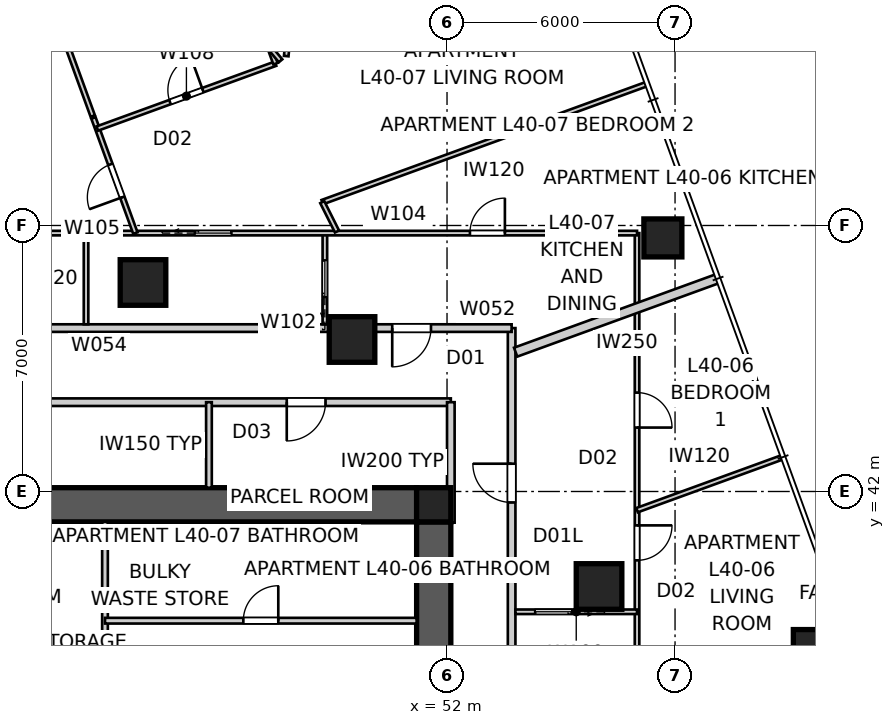
"""IFC4 building model, lengths in metres.
Left out: names, types, materials, properties, quantities, classifications, styles, units other than length and angle.
Written with IfcOpenShell. Run it as: python <this file> out.ifc"""

import sys

from ifc_helpers import new_model, si_unit, direction, frame, frame_2d, origin, origin_2d, place, context, subcontext, project, spatial, polyline, rectangle, outline, extrude, element, fill, save


model = new_model("IFC4")
c1 = context("Model", 3, precision=1e-05, world=origin(), true_north=direction((0.0, 1.0)))
c2 = subcontext(c1, "Body", "Model", "MODEL_VIEW")
j1 = project(units=[si_unit("LENGTHUNIT", "METRE"), si_unit("PLANEANGLEUNIT", "RADIAN")], contexts=[c1])
p1 = place(None, origin())
s1 = spatial("IfcSite", under=j1, at=p1, CompositionType="ELEMENT")
p2 = place(p1, origin())
s2 = spatial("IfcBuilding", under=s1, at=p2, CompositionType="ELEMENT")
p3 = place(p2, frame((0.0, 0.0, 147.2)))
s3 = spatial("IfcBuildingStorey", under=s2, at=p3, CompositionType="ELEMENT", Elevation=147.2)
p4 = place(p3, frame((28.8, 41.65, 0.0), z_axis=(0.0, 0.0, 1.0), x_axis=(1.0, 0.0, 0.0)))
e1 = element("IfcWall", 1, at=p4, inside=s3, PredefinedType="SHEAR", context=c2, shape_type="SweptSolid", body=[
    extrude(outline(polyline([(0.0, -0.45), (22.4, -0.45), (22.4, -0.025), (22.85, -0.025), (22.85, 0.025), (22.4, 0.025), (22.4, 0.45), (0.0, 0.45), (0.0, 0.025), (-0.45, 0.025), (-0.45, -0.025), (0.0, -0.025), (0.0, -0.45)])), origin(), (0.0, 0.0, 1.0), 3.4),
])
p5 = place(p3, frame((51.65, 18.8, 0.0), z_axis=(0.0, 0.0, 1.0), x_axis=(0.0, 1.0, 0.0)))
e2 = element("IfcWall", 2, at=p5, inside=s3, PredefinedType="SHEAR", context=c2, shape_type="SweptSolid", body=[
    extrude(outline(polyline([(0.0, -0.45), (22.4, -0.45), (22.4, -0.025), (22.85, -0.025), (22.85, 0.025), (22.4, 0.025), (22.4, 0.45), (0.0, 0.45), (0.0, 0.025), (-0.45, 0.025), (-0.45, -0.025), (0.0, -0.025), (0.0, -0.45)])), origin(), (0.0, 0.0, 1.0), 3.4),
])
p6 = place(p5, frame((11.14, 0.0, 0.0)))
e3 = element("IfcOpeningElement", 3, at=p6, cuts=e2, PredefinedType="OPENING", context=c2, shape_type="SweptSolid", body=[
    extrude(rectangle(XDim=1.02, YDim=2.4, at=frame_2d((0.51, 1.2))), frame((0.0, 0.46, 0.0), z_axis=(0.0, -1.0, 0.0), x_axis=(1.0, 0.0, 0.0)), (0.0, 0.0, 1.0), 0.92),
])
p7 = place(p3, frame((51.65, 41.65, 0.0), z_axis=(0.0, 0.0, 1.0), x_axis=(1.0, 0.0, 0.0)))
e4 = element("IfcColumn", 4, at=p7, inside=s3, PredefinedType="COLUMN", context=c2, shape_type="SweptSolid", body=[
    extrude(rectangle(XDim=0.9, YDim=0.9, at=origin_2d()), origin(), (0.0, 0.0, 1.0), 3.4),
])
for number, where, z_axis, x_axis in (
    (5, (61.613, 37.866, 0.0), (0.0, 0.0, 1.0), (1.0, 0.0, 0.0)),
    (6, (57.68, 48.673, 0.0), (0.0, 0.0, 1.0), (1.0, 0.0, 0.0)),
):
    element("IfcColumn", number, at=place(p3, frame(where, z_axis=z_axis, x_axis=x_axis)), inside=s3, PredefinedType="COLUMN", context=c2, shape_type="SweptSolid", body=[
        extrude(rectangle(XDim=1.0, YDim=1.0, at=origin_2d()), origin(), (0.0, 0.0, 1.0), 3.4),
    ])
for number, where, z_axis, x_axis in (
    (7, (56.0, 39.5, 0.0), (0.0, 0.0, 1.0), (1.0, 0.0, 0.0)),
    (8, (49.5, 46.0, 0.0), (0.0, 0.0, 1.0), (1.0, 0.0, 0.0)),
    (9, (44.0, 47.5, 0.0), (0.0, 0.0, 1.0), (1.0, 0.0, 0.0)),
):
    element("IfcColumn", number, at=place(p3, frame(where, z_axis=z_axis, x_axis=x_axis)), inside=s3, PredefinedType="COLUMN", context=c2, shape_type="SweptSolid", body=[
        extrude(rectangle(XDim=1.2, YDim=1.2, at=origin_2d()), origin(), (0.0, 0.0, 1.0), 3.4),
    ])
p8 = place(p3, frame((53.7, 13.3, 0.0), z_axis=(0.0, 0.0, 1.0), x_axis=(0.0, 1.0, 0.0)))
e10 = element("IfcWall", 10, at=p8, inside=s3, PredefinedType="PARTITIONING", context=c2, shape_type="SweptSolid", body=[
    extrude(rectangle(XDim=33.0, YDim=0.2, at=frame_2d((16.5, 0.0))), origin(), (0.0, 0.0, 1.0), 3.25),
])
p9 = place(p8, frame((28.411, 0.0, 0.0)))
e11 = element("IfcOpeningElement", 11, at=p9, cuts=e10, PredefinedType="OPENING", context=c2, shape_type="SweptSolid", body=[
    extrude(rectangle(XDim=1.02, YDim=2.1, at=frame_2d((0.51, 1.05))), frame((0.0, 0.11, 0.0), z_axis=(0.0, -1.0, 0.0), x_axis=(1.0, 0.0, 0.0)), (0.0, 0.0, 1.0), 0.22),
])
p10 = place(p8, frame((13.741, 0.0, 0.0)))
e12 = element("IfcOpeningElement", 12, at=p10, cuts=e10, PredefinedType="OPENING", context=c2, shape_type="SweptSolid", body=[
    extrude(rectangle(XDim=1.02, YDim=2.34, at=frame_2d((0.51, 1.17))), frame((0.0, 0.11, 0.0), z_axis=(0.0, -1.0, 0.0), x_axis=(1.0, 0.0, 0.0)), (0.0, 0.0, 1.0), 0.22),
])
p11 = place(p3, frame((53.7, 46.3, 0.0), z_axis=(0.0, 0.0, 1.0), x_axis=(-1.0, 0.0, 0.0)))
e13 = element("IfcWall", 13, at=p11, inside=s3, PredefinedType="PARTITIONING", context=c2, shape_type="SweptSolid", body=[
    extrude(rectangle(XDim=4.458, YDim=0.2, at=frame_2d((2.229, 0.0))), origin(), (0.0, 0.0, 1.0), 3.25),
])
p12 = place(p11, frame((2.122, 0.0, 0.0)))
e14 = element("IfcOpeningElement", 14, at=p12, cuts=e13, PredefinedType="OPENING", context=c2, shape_type="SweptSolid", body=[
    extrude(rectangle(XDim=1.02, YDim=2.34, at=frame_2d((0.51, 1.17))), frame((0.0, 0.11, 0.0), z_axis=(0.0, -1.0, 0.0), x_axis=(1.0, 0.0, 0.0)), (0.0, 0.0, 1.0), 0.22),
])
p13 = place(p3, frame((49.242, 46.3, 0.0), z_axis=(0.0, 0.0, 1.0), x_axis=(-1.0, 0.0, 0.0)))
e15 = element("IfcWall", 15, at=p13, inside=s3, PredefinedType="PARTITIONING", context=c2, shape_type="SweptSolid", body=[
    extrude(rectangle(XDim=1.683, YDim=0.2, at=frame_2d((0.842, 0.0))), origin(), (0.0, 0.0, 1.0), 2.55),
])
p14 = place(p3, frame((47.558, 46.3, 0.0), z_axis=(0.0, 0.0, 1.0), x_axis=(-1.0, 0.0, 0.0)))
e16 = element("IfcWall", 16, at=p14, inside=s3, PredefinedType="PARTITIONING", context=c2, shape_type="SweptSolid", body=[
    extrude(rectangle(XDim=15.117, YDim=0.2, at=frame_2d((7.558, 0.0))), origin(), (0.0, 0.0, 1.0), 3.25),
])
p15 = place(p14, frame((9.422, 0.0, 0.0)))
e17 = element("IfcOpeningElement", 17, at=p15, cuts=e16, PredefinedType="OPENING", context=c2, shape_type="SweptSolid", body=[
    extrude(rectangle(XDim=1.02, YDim=2.34, at=frame_2d((0.51, 1.17))), frame((0.0, 0.11, 0.0), z_axis=(0.0, -1.0, 0.0), x_axis=(1.0, 0.0, 0.0)), (0.0, 0.0, 1.0), 0.22),
])
p16 = place(p3, frame((62.553, 38.208, 0.0), z_axis=(0.0, 0.0, 1.0), x_axis=(-0.939693071685, -0.342018904489, 0.0)))
e18 = element("IfcWall", 18, at=p16, inside=s3, PredefinedType="PARTITIONING", context=c2, shape_type="SweptSolid", body=[
    extrude(rectangle(XDim=9.309, YDim=0.25, at=frame_2d((4.654, 0.0))), origin(), (0.0, 0.0, 1.0), 3.25),
])
p17 = place(p3, frame((59.132, 47.605, 0.0), z_axis=(0.0, 0.0, 1.0), x_axis=(-0.939690274876, -0.342026588591, 0.0)))
e19 = element("IfcWall", 19, at=p17, inside=s3, PredefinedType="PARTITIONING", context=c2, shape_type="SweptSolid", body=[
    extrude(rectangle(XDim=5.669, YDim=0.25, at=frame_2d((2.834, 0.0))), origin(), (0.0, 0.0, 1.0), 3.25),
])
p18 = place(p3, frame((43.0, 41.2, 0.0), z_axis=(0.0, 0.0, 1.0), x_axis=(0.0, -1.0, 0.0)))
e20 = element("IfcWall", 20, at=p18, inside=s3, PredefinedType="SOLIDWALL", context=c2, shape_type="SweptSolid", body=[
    extrude(rectangle(XDim=5.9, YDim=0.15, at=frame_2d((2.95, 0.0))), origin(), (0.0, 0.0, 1.0), 3.25),
])
p19 = place(p3, frame((43.0, 38.6, 0.0), z_axis=(0.0, 0.0, 1.0), x_axis=(1.0, 0.0, 0.0)))
e21 = element("IfcWall", 21, at=p19, inside=s3, PredefinedType="SOLIDWALL", context=c2, shape_type="SweptSolid", body=[
    extrude(rectangle(XDim=8.2, YDim=0.15, at=frame_2d((4.1, 0.0))), origin(), (0.0, 0.0, 1.0), 3.25),
])
p20 = place(p19, frame((3.64, 0.0, 0.0)))
e22 = element("IfcOpeningElement", 22, at=p20, cuts=e21, PredefinedType="OPENING", context=c2, shape_type="SweptSolid", body=[
    extrude(rectangle(XDim=0.92, YDim=2.1, at=frame_2d((0.46, 1.05))), frame((0.0, 0.085, 0.0), z_axis=(0.0, -1.0, 0.0), x_axis=(1.0, 0.0, 0.0)), (0.0, 0.0, 1.0), 0.17),
])
p21 = place(p3, frame((52.1, 44.35, 0.0), z_axis=(0.0, 0.0, 1.0), x_axis=(-1.0, 0.0, 0.0)))
e23 = element("IfcWall", 23, at=p21, inside=s3, PredefinedType="PARTITIONING", context=c2, shape_type="SweptSolid", body=[
    extrude(rectangle(XDim=24.2, YDim=0.2, at=frame_2d((12.1, 0.0))), origin(), (0.0, 0.0, 1.0), 3.25),
])
p22 = place(p21, frame((10.743, 0.0, 0.0)))
e24 = element("IfcOpeningElement", 24, at=p22, cuts=e23, PredefinedType="OPENING", context=c2, shape_type="SweptSolid", body=[
    extrude(rectangle(XDim=1.02, YDim=2.1, at=frame_2d((0.51, 1.05))), frame((0.0, 0.11, 0.0), z_axis=(0.0, -1.0, 0.0), x_axis=(1.0, 0.0, 0.0)), (0.0, 0.0, 1.0), 0.22),
])
p23 = place(p21, frame((19.636, 0.0, 0.0)))
e25 = element("IfcOpeningElement", 25, at=p23, cuts=e23, PredefinedType="OPENING", context=c2, shape_type="SweptSolid", body=[
    extrude(rectangle(XDim=1.02, YDim=2.1, at=frame_2d((0.51, 1.05))), frame((0.0, 0.11, 0.0), z_axis=(0.0, -1.0, 0.0), x_axis=(1.0, 0.0, 0.0)), (0.0, 0.0, 1.0), 0.22),
])
p24 = place(p21, frame((3.297, 0.0, 0.0)))
e26 = element("IfcOpeningElement", 26, at=p24, cuts=e23, PredefinedType="OPENING", context=c2, shape_type="SweptSolid", body=[
    extrude(rectangle(XDim=1.02, YDim=2.1, at=frame_2d((0.51, 1.05))), frame((0.0, 0.11, 0.0), z_axis=(0.0, -1.0, 0.0), x_axis=(1.0, 0.0, 0.0)), (0.0, 0.0, 1.0), 0.22),
])
p25 = place(p3, frame((52.1, 41.18, 0.0), z_axis=(0.0, 0.0, 1.0), x_axis=(0.0, 1.0, 0.0)))
e27 = element("IfcWall", 27, at=p25, inside=s3, PredefinedType="PARTITIONING", context=c2, shape_type="SweptSolid", body=[
    extrude(rectangle(XDim=3.17, YDim=0.2, at=frame_2d((1.585, 0.0))), origin(), (0.0, 0.0, 1.0), 3.25),
])
p26 = place(p3, frame((45.735, 42.1, 0.0), z_axis=(0.0, 0.0, 1.0), x_axis=(0.0, 1.0, 0.0)))
e28 = element("IfcWall", 28, at=p26, inside=s3, PredefinedType="SOLIDWALL", context=c2, shape_type="SweptSolid", body=[
    extrude(rectangle(XDim=2.25, YDim=0.15, at=frame_2d((1.125, 0.0))), origin(), (0.0, 0.0, 1.0), 2.796),
])
p27 = place(p3, frame((57.0, 48.8, 0.0), z_axis=(0.0, 0.0, 1.0), x_axis=(0.0, -1.0, 0.0)))
e29 = element("IfcWall", 29, at=p27, inside=s3, PredefinedType="PARTITIONING", context=c2, shape_type="SweptSolid", body=[
    extrude(rectangle(XDim=38.113, YDim=0.12, at=frame_2d((19.056, 0.0))), origin(), (0.0, 0.0, 1.0), 2.55),
])
p28 = place(p27, frame((4.198, 0.0, 0.0)))
e30 = element("IfcOpeningElement", 30, at=p28, cuts=e29, PredefinedType="OPENING", context=c2, shape_type="SweptSolid", body=[
    extrude(rectangle(XDim=0.92, YDim=2.34, at=frame_2d((0.46, 1.17))), frame((0.0, 0.07, 0.0), z_axis=(0.0, -1.0, 0.0), x_axis=(1.0, 0.0, 0.0)), (0.0, 0.0, 1.0), 0.14),
])
p29 = place(p27, frame((7.692, 0.0, 0.0)))
e31 = element("IfcOpeningElement", 31, at=p29, cuts=e29, PredefinedType="OPENING", context=c2, shape_type="SweptSolid", body=[
    extrude(rectangle(XDim=0.92, YDim=2.34, at=frame_2d((0.46, 1.17))), frame((0.0, 0.07, 0.0), z_axis=(0.0, -1.0, 0.0), x_axis=(1.0, 0.0, 0.0)), (0.0, 0.0, 1.0), 0.14),
])
p30 = place(p27, frame((20.162, 0.0, 0.0)))
e32 = element("IfcOpeningElement", 32, at=p30, cuts=e29, PredefinedType="OPENING", context=c2, shape_type="SweptSolid", body=[
    extrude(rectangle(XDim=0.92, YDim=2.34, at=frame_2d((0.46, 1.17))), frame((0.0, 0.07, 0.0), z_axis=(0.0, -1.0, 0.0), x_axis=(1.0, 0.0, 0.0)), (0.0, 0.0, 1.0), 0.14),
])
p31 = place(p27, frame((34.056, 0.0, 0.0)))
e33 = element("IfcOpeningElement", 33, at=p31, cuts=e29, PredefinedType="OPENING", context=c2, shape_type="SweptSolid", body=[
    extrude(rectangle(XDim=0.92, YDim=2.34, at=frame_2d((0.46, 1.17))), frame((0.0, 0.07, 0.0), z_axis=(0.0, -1.0, 0.0), x_axis=(1.0, 0.0, 0.0)), (0.0, 0.0, 1.0), 0.14),
])
p32 = place(p27, frame((24.482, 0.0, 0.0)))
e34 = element("IfcOpeningElement", 34, at=p32, cuts=e29, PredefinedType="OPENING", context=c2, shape_type="SweptSolid", body=[
    extrude(rectangle(XDim=0.96, YDim=2.1, at=frame_2d((0.48, 1.05))), frame((0.0, 0.07, 0.0), z_axis=(0.0, -1.0, 0.0), x_axis=(1.0, 0.0, 0.0)), (0.0, 0.0, 1.0), 0.14),
])
p33 = place(p3, frame((57.0, 38.835, 0.0), z_axis=(0.0, 0.0, 1.0), x_axis=(-1.0, 0.0, 0.0)))
e35 = element("IfcWall", 35, at=p33, inside=s3, PredefinedType="PARTITIONING", context=c2, shape_type="SweptSolid", body=[
    extrude(rectangle(XDim=3.2, YDim=0.12, at=frame_2d((1.6, 0.0))), origin(), (0.0, 0.0, 1.0), 2.796),
])
p34 = place(p33, frame((1.72, 0.0, 0.0)))
e36 = element("IfcOpeningElement", 36, at=p34, cuts=e35, PredefinedType="OPENING", context=c2, shape_type="SweptSolid", body=[
    extrude(rectangle(XDim=0.96, YDim=2.1, at=frame_2d((0.48, 1.05))), frame((0.0, 0.07, 0.0), z_axis=(0.0, -1.0, 0.0), x_axis=(1.0, 0.0, 0.0)), (0.0, 0.0, 1.0), 0.14),
])
p35 = place(p3, frame((57.0, 41.508, 0.0), z_axis=(0.0, 0.0, 1.0), x_axis=(0.939682468191, 0.342048036063, 0.0)))
e37 = element("IfcWall", 37, at=p35, inside=s3, PredefinedType="PARTITIONING", context=c2, shape_type="SweptSolid", body=[
    extrude(rectangle(XDim=4.049, YDim=0.12, at=frame_2d((2.024, 0.0))), origin(), (0.0, 0.0, 1.0), 3.25),
])
p36 = place(p3, frame((48.786, 46.4, 0.0), z_axis=(0.0, 0.0, 1.0), x_axis=(0.0, 1.0, 0.0)))
e38 = element("IfcWall", 38, at=p36, inside=s3, PredefinedType="PARTITIONING", context=c2, shape_type="SweptSolid", body=[
    extrude(rectangle(XDim=2.4, YDim=0.12, at=frame_2d((1.2, 0.0))), origin(), (0.0, 0.0, 1.0), 3.25),
])
p37 = place(p36, frame((0.72, 0.0, 0.0)))
e39 = element("IfcOpeningElement", 39, at=p37, cuts=e38, PredefinedType="OPENING", context=c2, shape_type="SweptSolid", body=[
    extrude(rectangle(XDim=0.96, YDim=2.1, at=frame_2d((0.48, 1.05))), frame((0.0, 0.07, 0.0), z_axis=(0.0, -1.0, 0.0), x_axis=(1.0, 0.0, 0.0)), (0.0, 0.0, 1.0), 0.14),
])
p38 = place(p3, frame((42.501, 46.4, 0.0), z_axis=(0.0, 0.0, 1.0), x_axis=(0.0, 1.0, 0.0)))
e40 = element("IfcWall", 40, at=p38, inside=s3, PredefinedType="PARTITIONING", context=c2, shape_type="SweptSolid", body=[
    extrude(rectangle(XDim=2.4, YDim=0.12, at=frame_2d((1.2, 0.0))), origin(), (0.0, 0.0, 1.0), 3.25),
])
p39 = place(p3, frame((37.2, 48.8, 0.0), z_axis=(0.0, 0.0, 1.0), x_axis=(1.0, 0.0, 0.0)))
e41 = element("IfcWall", 41, at=p39, inside=s3, PredefinedType="PARTITIONING", context=c2, shape_type="SweptSolid", body=[
    extrude(rectangle(XDim=19.8, YDim=0.12, at=frame_2d((9.9, 0.0))), origin(), (0.0, 0.0, 1.0), 3.25),
])
p40 = place(p39, frame((15.403, 0.0, 0.0)))
e42 = element("IfcOpeningElement", 42, at=p40, cuts=e41, PredefinedType="OPENING", context=c2, shape_type="SweptSolid", body=[
    extrude(rectangle(XDim=0.92, YDim=2.34, at=frame_2d((0.46, 1.17))), frame((0.0, 0.07, 0.0), z_axis=(0.0, -1.0, 0.0), x_axis=(1.0, 0.0, 0.0)), (0.0, 0.0, 1.0), 0.14),
])
p41 = place(p39, frame((8.165, 0.0, 0.0)))
e43 = element("IfcOpeningElement", 43, at=p41, cuts=e41, PredefinedType="OPENING", context=c2, shape_type="SweptSolid", body=[
    extrude(rectangle(XDim=0.96, YDim=2.1, at=frame_2d((0.48, 1.05))), frame((0.0, 0.07, 0.0), z_axis=(0.0, -1.0, 0.0), x_axis=(1.0, 0.0, 0.0)), (0.0, 0.0, 1.0), 0.14),
])
p42 = place(p39, frame((2.81, 0.0, 0.0)))
e44 = element("IfcOpeningElement", 44, at=p42, cuts=e41, PredefinedType="OPENING", context=c2, shape_type="SweptSolid", body=[
    extrude(rectangle(XDim=0.96, YDim=2.1, at=frame_2d((0.48, 1.05))), frame((0.0, 0.07, 0.0), z_axis=(0.0, -1.0, 0.0), x_axis=(1.0, 0.0, 0.0)), (0.0, 0.0, 1.0), 0.14),
])
p43 = place(p3, frame((43.799, 48.8, 0.0), z_axis=(0.0, 0.0, 1.0), x_axis=(-0.342034943783, 0.939687233728, 0.0)))
e45 = element("IfcWall", 45, at=p43, inside=s3, PredefinedType="PARTITIONING", context=c2, shape_type="SweptSolid", body=[
    extrude(rectangle(XDim=3.223, YDim=0.12, at=frame_2d((1.612, 0.0))), origin(), (0.0, 0.0, 1.0), 3.25),
])
p44 = place(p43, frame((1.004, 0.0, 0.0)))
e46 = element("IfcOpeningElement", 46, at=p44, cuts=e45, PredefinedType="OPENING", context=c2, shape_type="SweptSolid", body=[
    extrude(rectangle(XDim=0.92, YDim=2.34, at=frame_2d((0.46, 1.17))), frame((0.0, 0.07, 0.0), z_axis=(0.0, -1.0, 0.0), x_axis=(1.0, 0.0, 0.0)), (0.0, 0.0, 1.0), 0.14),
])
p45 = place(p3, frame((57.231, 52.713, 0.0), z_axis=(0.0, 0.0, 1.0), x_axis=(-0.939692673089, -0.342019999623, 0.0)))
e47 = element("IfcWall", 47, at=p45, inside=s3, PredefinedType="PARTITIONING", context=c2, shape_type="SweptSolid", body=[
    extrude(rectangle(XDim=9.06, YDim=0.12, at=frame_2d((4.53, 0.0))), origin(), (0.0, 0.0, 1.0), 3.25),
])
p46 = place(p3, frame((48.717, 49.615, 0.0), z_axis=(0.0, 0.0, 1.0), x_axis=(0.448117513314, -0.893974660861, 0.0)))
e48 = element("IfcWall", 48, at=p46, inside=s3, PredefinedType="PARTITIONING", context=c2, shape_type="SweptSolid", body=[
    extrude(rectangle(XDim=0.864, YDim=0.12, at=frame_2d((0.432, 0.0))), origin(), (0.0, 0.0, 1.0), 3.25),
])
p47 = place(p3, frame((42.798, 51.551, 0.0), z_axis=(0.0, 0.0, 1.0), x_axis=(0.939699104319, 0.342002329438, 0.0)))
e49 = element("IfcWall", 49, at=p47, inside=s3, PredefinedType="PARTITIONING", context=c2, shape_type="SweptSolid", body=[
    extrude(rectangle(XDim=4.99, YDim=0.12, at=frame_2d((2.495, 0.0))), origin(), (0.0, 0.0, 1.0), 3.25),
])
p48 = place(p47, frame((2.035, 0.0, 0.0)))
e50 = element("IfcOpeningElement", 50, at=p48, cuts=e49, PredefinedType="OPENING", context=c2, shape_type="SweptSolid", body=[
    extrude(rectangle(XDim=0.92, YDim=2.34, at=frame_2d((0.46, 1.17))), frame((0.0, 0.07, 0.0), z_axis=(0.0, -1.0, 0.0), x_axis=(1.0, 0.0, 0.0)), (0.0, 0.0, 1.0), 0.14),
])
for number, where, z_axis, x_axis in (
    (51, (47.487, 53.258, 0.0), (0.0, 0.0, 1.0), (-0.342, 0.94, 0.0)),
    (52, (47.344, 53.667, 0.0), (0.0, 0.0, 1.0), (0.639, -0.77, 0.0)),
):
    element("IfcWall", number, at=place(p3, frame(where, z_axis=z_axis, x_axis=x_axis)), inside=s3, PredefinedType="PARTITIONING", context=c2, shape_type="SweptSolid", body=[
        extrude(rectangle(XDim=0.433, YDim=0.12, at=frame_2d((0.216, 0.0))), origin(), (0.0, 0.0, 1.0), 3.25),
    ])
p49 = place(p3, frame((47.769, 53.458, 0.0), z_axis=(0.0, 0.0, 1.0), x_axis=(0.093212941297, 0.995646195983, 0.0)))
e53 = element("IfcWall", 53, at=p49, inside=s3, PredefinedType="PARTITIONING", context=c2, shape_type="SweptSolid", body=[
    extrude(rectangle(XDim=0.296, YDim=0.12, at=frame_2d((0.148, 0.0))), origin(), (0.0, 0.0, 1.0), 3.25),
])
p50 = place(p3, frame((41.202, 55.935, 0.0), z_axis=(0.0, 0.0, 1.0), x_axis=(0.341992887332, -0.939702540709, 0.0)))
e54 = element("IfcWall", 54, at=p50, inside=s3, PredefinedType="PARTITIONING", context=c2, shape_type="SweptSolid", body=[
    extrude(rectangle(XDim=4.315, YDim=0.12, at=frame_2d((2.158, 0.0))), origin(), (0.0, 0.0, 1.0), 3.25),
])
p51 = place(p9, origin())
e55 = element("IfcDoor", 55, at=p51, inside=s3, OperationType="SINGLE_SWING_RIGHT", PredefinedType="DOOR", context=c2, shape_type="SweptSolid", body=[
    extrude(rectangle(XDim=1.02, YDim=2.1, at=frame_2d((0.51, 1.05))), frame((0.0, 0.025, 0.0), z_axis=(0.0, -1.0, 0.0), x_axis=(1.0, 0.0, 0.0)), (0.0, 0.0, 1.0), 0.05),
])
fill(e11, e55)
p52 = place(p24, origin())
e56 = element("IfcDoor", 56, at=p52, inside=s3, OperationType="SINGLE_SWING_RIGHT", PredefinedType="DOOR", context=c2, shape_type="SweptSolid", body=[
    extrude(rectangle(XDim=1.02, YDim=2.1, at=frame_2d((0.51, 1.05))), frame((0.0, 0.025, 0.0), z_axis=(0.0, -1.0, 0.0), x_axis=(1.0, 0.0, 0.0)), (0.0, 0.0, 1.0), 0.05),
])
fill(e26, e56)
p53 = place(p12, origin())
e57 = element("IfcDoor", 57, at=p53, inside=s3, OperationType="SINGLE_SWING_RIGHT", PredefinedType="DOOR", context=c2, shape_type="SweptSolid", body=[
    extrude(rectangle(XDim=1.02, YDim=2.34, at=frame_2d((0.51, 1.17))), frame((0.0, 0.025, 0.0), z_axis=(0.0, -1.0, 0.0), x_axis=(1.0, 0.0, 0.0)), (0.0, 0.0, 1.0), 0.05),
])
fill(e14, e57)
p54 = place(p20, origin())
e58 = element("IfcDoor", 58, at=p54, inside=s3, OperationType="SINGLE_SWING_RIGHT", PredefinedType="DOOR", context=c2, shape_type="SweptSolid", body=[
    extrude(rectangle(XDim=0.92, YDim=2.1, at=frame_2d((0.46, 1.05))), frame((0.0, 0.025, 0.0), z_axis=(0.0, -1.0, 0.0), x_axis=(1.0, 0.0, 0.0)), (0.0, 0.0, 1.0), 0.05),
])
fill(e22, e58)
p55 = place(p28, origin())
e59 = element("IfcDoor", 59, at=p55, inside=s3, OperationType="SINGLE_SWING_RIGHT", PredefinedType="DOOR", context=c2, shape_type="SweptSolid", body=[
    extrude(rectangle(XDim=0.92, YDim=2.34, at=frame_2d((0.46, 1.17))), frame((0.0, 0.025, 0.0), z_axis=(0.0, -1.0, 0.0), x_axis=(1.0, 0.0, 0.0)), (0.0, 0.0, 1.0), 0.05),
])
fill(e30, e59)
p56 = place(p34, origin())
e60 = element("IfcDoor", 60, at=p56, inside=s3, OperationType="SLIDING_TO_LEFT", PredefinedType="DOOR", context=c2, shape_type="SweptSolid", body=[
    extrude(rectangle(XDim=0.96, YDim=2.1, at=frame_2d((0.48, 1.05))), frame((0.0, 0.025, 0.0), z_axis=(0.0, -1.0, 0.0), x_axis=(1.0, 0.0, 0.0)), (0.0, 0.0, 1.0), 0.05),
])
fill(e36, e60)
p57 = place(p29, origin())
e61 = element("IfcDoor", 61, at=p57, inside=s3, OperationType="SINGLE_SWING_LEFT", PredefinedType="DOOR", context=c2, shape_type="SweptSolid", body=[
    extrude(rectangle(XDim=0.92, YDim=2.34, at=frame_2d((0.46, 1.17))), frame((0.0, 0.025, 0.0), z_axis=(0.0, -1.0, 0.0), x_axis=(1.0, 0.0, 0.0)), (0.0, 0.0, 1.0), 0.05),
])
fill(e31, e61)
p58 = place(p40, origin())
e62 = element("IfcDoor", 62, at=p58, inside=s3, OperationType="SINGLE_SWING_RIGHT", PredefinedType="DOOR", context=c2, shape_type="SweptSolid", body=[
    extrude(rectangle(XDim=0.92, YDim=2.34, at=frame_2d((0.46, 1.17))), frame((0.0, 0.025, 0.0), z_axis=(0.0, -1.0, 0.0), x_axis=(1.0, 0.0, 0.0)), (0.0, 0.0, 1.0), 0.05),
])
fill(e42, e62)
p59 = place(p37, origin())
e63 = element("IfcDoor", 63, at=p59, inside=s3, OperationType="SLIDING_TO_LEFT", PredefinedType="DOOR", context=c2, shape_type="SweptSolid", body=[
    extrude(rectangle(XDim=0.96, YDim=2.1, at=frame_2d((0.48, 1.05))), frame((0.0, 0.025, 0.0), z_axis=(0.0, -1.0, 0.0), x_axis=(1.0, 0.0, 0.0)), (0.0, 0.0, 1.0), 0.05),
])
fill(e39, e63)
p60 = place(p41, origin())
e64 = element("IfcDoor", 64, at=p60, inside=s3, OperationType="SLIDING_TO_LEFT", PredefinedType="DOOR", context=c2, shape_type="SweptSolid", body=[
    extrude(rectangle(XDim=0.96, YDim=2.1, at=frame_2d((0.48, 1.05))), frame((0.0, 0.025, 0.0), z_axis=(0.0, -1.0, 0.0), x_axis=(1.0, 0.0, 0.0)), (0.0, 0.0, 1.0), 0.05),
])
fill(e43, e64)
p61 = place(p48, origin())
e65 = element("IfcDoor", 65, at=p61, inside=s3, OperationType="SINGLE_SWING_RIGHT", PredefinedType="DOOR", context=c2, shape_type="SweptSolid", body=[
    extrude(rectangle(XDim=0.92, YDim=2.34, at=frame_2d((0.46, 1.17))), frame((0.0, 0.025, 0.0), z_axis=(0.0, -1.0, 0.0), x_axis=(1.0, 0.0, 0.0)), (0.0, 0.0, 1.0), 0.05),
])
fill(e50, e65)
p62 = place(p44, origin())
e66 = element("IfcDoor", 66, at=p62, inside=s3, OperationType="SINGLE_SWING_LEFT", PredefinedType="DOOR", context=c2, shape_type="SweptSolid", body=[
    extrude(rectangle(XDim=0.92, YDim=2.34, at=frame_2d((0.46, 1.17))), frame((0.0, 0.025, 0.0), z_axis=(0.0, -1.0, 0.0), x_axis=(1.0, 0.0, 0.0)), (0.0, 0.0, 1.0), 0.05),
])
fill(e46, e66)
save(model, sys.argv[1])
